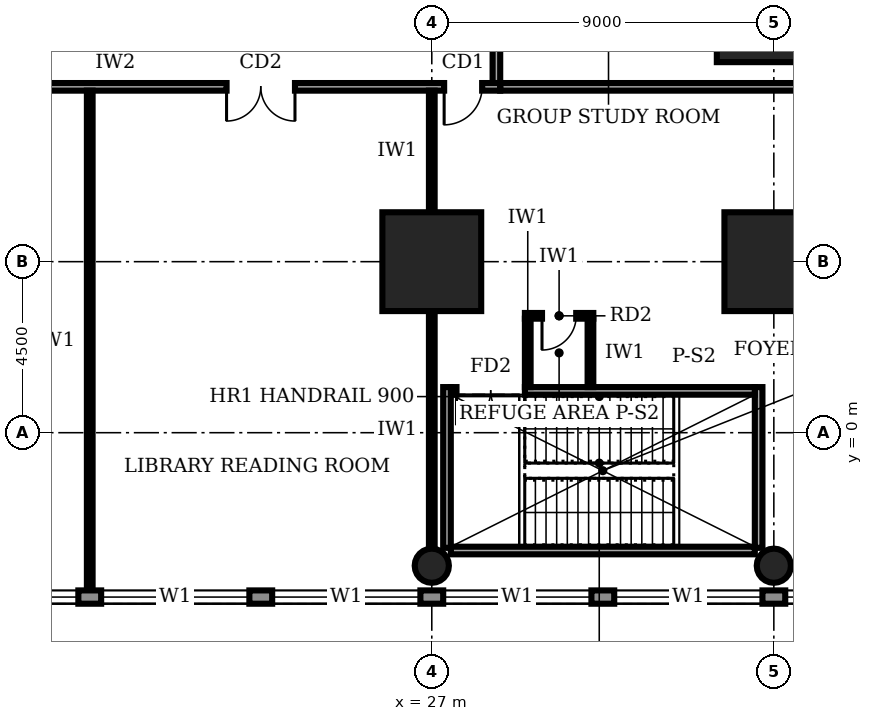
"""IFC4 building model, lengths in metres.
Left out: names, types, materials, properties, quantities, classifications, styles, units other than length and angle.
Written with IfcOpenShell. Run it as: python <this file> out.ifc"""

import sys

from ifc_helpers import new_model, si_unit, direction, frame, frame_2d, origin, origin_2d, place, context, subcontext, project, spatial, rectangle, circle, extrude, element, fill, save


model = new_model("IFC4")
c1 = context("Model", 3, precision=1e-05, world=origin(), true_north=direction((0.0, 1.0)))
c2 = subcontext(c1, "Body", "Model", "MODEL_VIEW")
j1 = project(units=[si_unit("LENGTHUNIT", "METRE"), si_unit("PLANEANGLEUNIT", "RADIAN")], contexts=[c1])
p1 = place(None, origin())
s1 = spatial("IfcSite", under=j1, at=p1, CompositionType="ELEMENT")
p2 = place(p1, origin())
s2 = spatial("IfcBuilding", under=s1, at=p2, CompositionType="ELEMENT")
p3 = place(p2, frame((0.0, 0.0, 11.0)))
s3 = spatial("IfcBuildingStorey", under=s2, at=p3, CompositionType="ELEMENT", Elevation=11.0)
for number, where, z_axis, x_axis in (
    (1, (27.0, 4.5, 0.0), (0.0, 0.0, 1.0), (1.0, 0.0, 0.0)),
    (2, (36.0, 4.5, 0.0), (0.0, 0.0, 1.0), (1.0, 0.0, 0.0)),
):
    element("IfcColumn", number, at=place(p3, frame(where, z_axis=z_axis, x_axis=x_axis)), inside=s3, PredefinedType="COLUMN", context=c2, shape_type="SweptSolid", body=[
        extrude(rectangle(XDim=2.6, YDim=2.6, at=origin_2d()), origin(), (0.0, 0.0, 1.0), 5.0),
    ])
p4 = place(p3, frame((36.0, 11.25, 0.0), z_axis=(0.0, 0.0, 1.0), x_axis=(1.0, 0.0, 0.0)))
e3 = element("IfcColumn", 3, at=p4, inside=s3, PredefinedType="COLUMN", context=c2, shape_type="SweptSolid", body=[
    extrude(rectangle(XDim=3.0, YDim=3.0, at=origin_2d()), origin(), (0.0, 0.0, 1.0), 5.0),
])
for number, where, z_axis, x_axis in (
    (4, (27.0, -3.5, 0.0), (0.0, 0.0, 1.0), (1.0, 0.0, 0.0)),
    (5, (36.0, -3.5, 0.0), (0.0, 0.0, 1.0), (1.0, 0.0, 0.0)),
):
    element("IfcColumn", number, at=place(p3, frame(where, z_axis=z_axis, x_axis=x_axis)), inside=s3, PredefinedType="COLUMN", context=c2, shape_type="SweptSolid", body=[
        extrude(circle(Radius=0.45, at=origin_2d()), origin(), (0.0, 0.0, 1.0), 5.0),
    ])
p5 = place(p3, frame((0.02, -4.325, 0.0), z_axis=(0.0, 0.0, 1.0), x_axis=(1.0, 0.0, 0.0)))
e6 = element("IfcWall", 6, at=p5, inside=s3, PredefinedType="STANDARD", context=c2, shape_type="SweptSolid", body=[
    extrude(rectangle(XDim=98.96, YDim=0.35, at=frame_2d((49.48, 0.0))), origin(), (0.0, 0.0, 1.0), 4.7),
])
p6 = place(p5, frame((4.78, 0.0, 0.9)))
e7 = element("IfcOpeningElement", 7, at=p6, cuts=e6, PredefinedType="OPENING", context=c2, shape_type="SweptSolid", body=[
    extrude(rectangle(XDim=3.9, YDim=2.2, at=frame_2d((1.95, 1.1))), frame((0.0, 0.185, 0.0), z_axis=(0.0, -1.0, 0.0), x_axis=(1.0, 0.0, 0.0)), (0.0, 0.0, 1.0), 0.37),
])
p7 = place(p5, frame((9.28, 0.0, 0.9)))
e8 = element("IfcOpeningElement", 8, at=p7, cuts=e6, PredefinedType="OPENING", context=c2, shape_type="SweptSolid", body=[
    extrude(rectangle(XDim=3.9, YDim=2.2, at=frame_2d((1.95, 1.1))), frame((0.0, 0.185, 0.0), z_axis=(0.0, -1.0, 0.0), x_axis=(1.0, 0.0, 0.0)), (0.0, 0.0, 1.0), 0.37),
])
p8 = place(p5, frame((13.78, 0.0, 0.9)))
e9 = element("IfcOpeningElement", 9, at=p8, cuts=e6, PredefinedType="OPENING", context=c2, shape_type="SweptSolid", body=[
    extrude(rectangle(XDim=3.9, YDim=2.2, at=frame_2d((1.95, 1.1))), frame((0.0, 0.185, 0.0), z_axis=(0.0, -1.0, 0.0), x_axis=(1.0, 0.0, 0.0)), (0.0, 0.0, 1.0), 0.37),
])
p9 = place(p5, frame((18.28, 0.0, 0.9)))
e10 = element("IfcOpeningElement", 10, at=p9, cuts=e6, PredefinedType="OPENING", context=c2, shape_type="SweptSolid", body=[
    extrude(rectangle(XDim=3.9, YDim=2.2, at=frame_2d((1.95, 1.1))), frame((0.0, 0.185, 0.0), z_axis=(0.0, -1.0, 0.0), x_axis=(1.0, 0.0, 0.0)), (0.0, 0.0, 1.0), 0.37),
])
p10 = place(p5, frame((22.78, 0.0, 0.9)))
e11 = element("IfcOpeningElement", 11, at=p10, cuts=e6, PredefinedType="OPENING", context=c2, shape_type="SweptSolid", body=[
    extrude(rectangle(XDim=3.9, YDim=2.2, at=frame_2d((1.95, 1.1))), frame((0.0, 0.185, 0.0), z_axis=(0.0, -1.0, 0.0), x_axis=(1.0, 0.0, 0.0)), (0.0, 0.0, 1.0), 0.37),
])
p11 = place(p5, frame((27.28, 0.0, 0.9)))
e12 = element("IfcOpeningElement", 12, at=p11, cuts=e6, PredefinedType="OPENING", context=c2, shape_type="SweptSolid", body=[
    extrude(rectangle(XDim=3.9, YDim=2.2, at=frame_2d((1.95, 1.1))), frame((0.0, 0.185, 0.0), z_axis=(0.0, -1.0, 0.0), x_axis=(1.0, 0.0, 0.0)), (0.0, 0.0, 1.0), 0.37),
])
p12 = place(p5, frame((31.78, 0.0, 0.9)))
e13 = element("IfcOpeningElement", 13, at=p12, cuts=e6, PredefinedType="OPENING", context=c2, shape_type="SweptSolid", body=[
    extrude(rectangle(XDim=3.9, YDim=2.2, at=frame_2d((1.95, 1.1))), frame((0.0, 0.185, 0.0), z_axis=(0.0, -1.0, 0.0), x_axis=(1.0, 0.0, 0.0)), (0.0, 0.0, 1.0), 0.37),
])
p13 = place(p5, frame((36.28, 0.0, 0.9)))
e14 = element("IfcOpeningElement", 14, at=p13, cuts=e6, PredefinedType="OPENING", context=c2, shape_type="SweptSolid", body=[
    extrude(rectangle(XDim=3.9, YDim=2.2, at=frame_2d((1.95, 1.1))), frame((0.0, 0.185, 0.0), z_axis=(0.0, -1.0, 0.0), x_axis=(1.0, 0.0, 0.0)), (0.0, 0.0, 1.0), 0.37),
])
p14 = place(p5, frame((40.78, 0.0, 0.9)))
e15 = element("IfcOpeningElement", 15, at=p14, cuts=e6, PredefinedType="OPENING", context=c2, shape_type="SweptSolid", body=[
    extrude(rectangle(XDim=3.9, YDim=2.2, at=frame_2d((1.95, 1.1))), frame((0.0, 0.185, 0.0), z_axis=(0.0, -1.0, 0.0), x_axis=(1.0, 0.0, 0.0)), (0.0, 0.0, 1.0), 0.37),
])
p15 = place(p5, frame((45.28, 0.0, 0.9)))
e16 = element("IfcOpeningElement", 16, at=p15, cuts=e6, PredefinedType="OPENING", context=c2, shape_type="SweptSolid", body=[
    extrude(rectangle(XDim=3.9, YDim=2.2, at=frame_2d((1.95, 1.1))), frame((0.0, 0.185, 0.0), z_axis=(0.0, -1.0, 0.0), x_axis=(1.0, 0.0, 0.0)), (0.0, 0.0, 1.0), 0.37),
])
p16 = place(p5, frame((49.78, 0.0, 0.9)))
e17 = element("IfcOpeningElement", 17, at=p16, cuts=e6, PredefinedType="OPENING", context=c2, shape_type="SweptSolid", body=[
    extrude(rectangle(XDim=3.9, YDim=2.2, at=frame_2d((1.95, 1.1))), frame((0.0, 0.185, 0.0), z_axis=(0.0, -1.0, 0.0), x_axis=(1.0, 0.0, 0.0)), (0.0, 0.0, 1.0), 0.37),
])
p17 = place(p5, frame((54.28, 0.0, 0.9)))
e18 = element("IfcOpeningElement", 18, at=p17, cuts=e6, PredefinedType="OPENING", context=c2, shape_type="SweptSolid", body=[
    extrude(rectangle(XDim=3.9, YDim=2.2, at=frame_2d((1.95, 1.1))), frame((0.0, 0.185, 0.0), z_axis=(0.0, -1.0, 0.0), x_axis=(1.0, 0.0, 0.0)), (0.0, 0.0, 1.0), 0.37),
])
p18 = place(p5, frame((58.78, 0.0, 0.9)))
e19 = element("IfcOpeningElement", 19, at=p18, cuts=e6, PredefinedType="OPENING", context=c2, shape_type="SweptSolid", body=[
    extrude(rectangle(XDim=3.9, YDim=2.2, at=frame_2d((1.95, 1.1))), frame((0.0, 0.185, 0.0), z_axis=(0.0, -1.0, 0.0), x_axis=(1.0, 0.0, 0.0)), (0.0, 0.0, 1.0), 0.37),
])
p19 = place(p5, frame((63.28, 0.0, 0.9)))
e20 = element("IfcOpeningElement", 20, at=p19, cuts=e6, PredefinedType="OPENING", context=c2, shape_type="SweptSolid", body=[
    extrude(rectangle(XDim=3.9, YDim=2.2, at=frame_2d((1.95, 1.1))), frame((0.0, 0.185, 0.0), z_axis=(0.0, -1.0, 0.0), x_axis=(1.0, 0.0, 0.0)), (0.0, 0.0, 1.0), 0.37),
])
p20 = place(p5, frame((67.78, 0.0, 0.9)))
e21 = element("IfcOpeningElement", 21, at=p20, cuts=e6, PredefinedType="OPENING", context=c2, shape_type="SweptSolid", body=[
    extrude(rectangle(XDim=3.9, YDim=2.2, at=frame_2d((1.95, 1.1))), frame((0.0, 0.185, 0.0), z_axis=(0.0, -1.0, 0.0), x_axis=(1.0, 0.0, 0.0)), (0.0, 0.0, 1.0), 0.37),
])
p21 = place(p5, frame((72.28, 0.0, 0.9)))
e22 = element("IfcOpeningElement", 22, at=p21, cuts=e6, PredefinedType="OPENING", context=c2, shape_type="SweptSolid", body=[
    extrude(rectangle(XDim=3.9, YDim=2.2, at=frame_2d((1.95, 1.1))), frame((0.0, 0.185, 0.0), z_axis=(0.0, -1.0, 0.0), x_axis=(1.0, 0.0, 0.0)), (0.0, 0.0, 1.0), 0.37),
])
p22 = place(p5, frame((76.78, 0.0, 0.9)))
e23 = element("IfcOpeningElement", 23, at=p22, cuts=e6, PredefinedType="OPENING", context=c2, shape_type="SweptSolid", body=[
    extrude(rectangle(XDim=3.9, YDim=2.2, at=frame_2d((1.95, 1.1))), frame((0.0, 0.185, 0.0), z_axis=(0.0, -1.0, 0.0), x_axis=(1.0, 0.0, 0.0)), (0.0, 0.0, 1.0), 0.37),
])
p23 = place(p5, frame((81.28, 0.0, 0.9)))
e24 = element("IfcOpeningElement", 24, at=p23, cuts=e6, PredefinedType="OPENING", context=c2, shape_type="SweptSolid", body=[
    extrude(rectangle(XDim=3.9, YDim=2.2, at=frame_2d((1.95, 1.1))), frame((0.0, 0.185, 0.0), z_axis=(0.0, -1.0, 0.0), x_axis=(1.0, 0.0, 0.0)), (0.0, 0.0, 1.0), 0.37),
])
p24 = place(p5, frame((85.78, 0.0, 0.9)))
e25 = element("IfcOpeningElement", 25, at=p24, cuts=e6, PredefinedType="OPENING", context=c2, shape_type="SweptSolid", body=[
    extrude(rectangle(XDim=3.9, YDim=2.2, at=frame_2d((1.95, 1.1))), frame((0.0, 0.185, 0.0), z_axis=(0.0, -1.0, 0.0), x_axis=(1.0, 0.0, 0.0)), (0.0, 0.0, 1.0), 0.37),
])
p25 = place(p5, frame((90.28, 0.0, 0.9)))
e26 = element("IfcOpeningElement", 26, at=p25, cuts=e6, PredefinedType="OPENING", context=c2, shape_type="SweptSolid", body=[
    extrude(rectangle(XDim=3.9, YDim=2.2, at=frame_2d((1.95, 1.1))), frame((0.0, 0.185, 0.0), z_axis=(0.0, -1.0, 0.0), x_axis=(1.0, 0.0, 0.0)), (0.0, 0.0, 1.0), 0.37),
])
p26 = place(p5, frame((94.71, 0.0, 0.9)))
e27 = element("IfcOpeningElement", 27, at=p26, cuts=e6, PredefinedType="OPENING", context=c2, shape_type="SweptSolid", body=[
    extrude(rectangle(XDim=3.9, YDim=2.2, at=frame_2d((1.95, 1.1))), frame((0.0, 0.185, 0.0), z_axis=(0.0, -1.0, 0.0), x_axis=(1.0, 0.0, 0.0)), (0.0, 0.0, 1.0), 0.37),
])
p27 = place(p3, frame((11.9, 9.1, 0.0), z_axis=(0.0, 0.0, 1.0), x_axis=(1.0, 0.0, 0.0)))
e28 = element("IfcWall", 28, at=p27, inside=s3, PredefinedType="SOLIDWALL", context=c2, shape_type="SweptSolid", body=[
    extrude(rectangle(XDim=16.9, YDim=0.2, at=frame_2d((8.45, 0.0))), origin(), (0.0, 0.0, 1.0), 4.7),
])
p28 = place(p27, frame((2.05, 0.0, 0.0)))
e29 = element("IfcOpeningElement", 29, at=p28, cuts=e28, PredefinedType="OPENING", context=c2, shape_type="SweptSolid", body=[
    extrude(rectangle(XDim=1.8, YDim=2.1, at=frame_2d((0.9, 1.05))), frame((0.0, 0.11, 0.0), z_axis=(0.0, -1.0, 0.0), x_axis=(1.0, 0.0, 0.0)), (0.0, 0.0, 1.0), 0.22),
])
p29 = place(p27, frame((9.7, 0.0, 0.0)))
e30 = element("IfcOpeningElement", 30, at=p29, cuts=e28, PredefinedType="OPENING", context=c2, shape_type="SweptSolid", body=[
    extrude(rectangle(XDim=1.8, YDim=2.1, at=frame_2d((0.9, 1.05))), frame((0.0, 0.11, 0.0), z_axis=(0.0, -1.0, 0.0), x_axis=(1.0, 0.0, 0.0)), (0.0, 0.0, 1.0), 0.22),
])
p30 = place(p27, frame((15.425, 0.0, 0.0)))
e31 = element("IfcOpeningElement", 31, at=p30, cuts=e28, PredefinedType="OPENING", context=c2, shape_type="SweptSolid", body=[
    extrude(rectangle(XDim=1.0, YDim=2.1, at=frame_2d((0.5, 1.05))), frame((0.0, 0.11, 0.0), z_axis=(0.0, -1.0, 0.0), x_axis=(1.0, 0.0, 0.0)), (0.0, 0.0, 1.0), 0.22),
])
p31 = place(p3, frame((28.7, 9.2, 0.0), z_axis=(0.0, 0.0, 1.0), x_axis=(0.0, 1.0, 0.0)))
e32 = element("IfcWall", 32, at=p31, inside=s3, PredefinedType="SOLIDWALL", context=c2, shape_type="SweptSolid", body=[
    extrude(rectangle(XDim=22.3, YDim=0.2, at=frame_2d((11.15, 0.0))), origin(), (0.0, 0.0, 1.0), 4.7),
])
p32 = place(p31, frame((1.55, 0.0, 0.0)))
e33 = element("IfcOpeningElement", 33, at=p32, cuts=e32, PredefinedType="OPENING", context=c2, shape_type="SweptSolid", body=[
    extrude(rectangle(XDim=1.0, YDim=2.1, at=frame_2d((0.5, 1.05))), frame((0.0, 0.11, 0.0), z_axis=(0.0, -1.0, 0.0), x_axis=(1.0, 0.0, 0.0)), (0.0, 0.0, 1.0), 0.22),
])
p33 = place(p31, frame((6.05, 0.0, 0.0)))
e34 = element("IfcOpeningElement", 34, at=p33, cuts=e32, PredefinedType="OPENING", context=c2, shape_type="SweptSolid", body=[
    extrude(rectangle(XDim=1.0, YDim=2.1, at=frame_2d((0.5, 1.05))), frame((0.0, 0.11, 0.0), z_axis=(0.0, -1.0, 0.0), x_axis=(1.0, 0.0, 0.0)), (0.0, 0.0, 1.0), 0.22),
])
p34 = place(p31, frame((12.4, 0.0, 0.0)))
e35 = element("IfcOpeningElement", 35, at=p34, cuts=e32, PredefinedType="OPENING", context=c2, shape_type="SweptSolid", body=[
    extrude(rectangle(XDim=1.8, YDim=2.1, at=frame_2d((0.9, 1.05))), frame((0.0, 0.11, 0.0), z_axis=(0.0, -1.0, 0.0), x_axis=(1.0, 0.0, 0.0)), (0.0, 0.0, 1.0), 0.22),
])
p35 = place(p31, frame((19.55, 0.0, 0.0)))
e36 = element("IfcOpeningElement", 36, at=p35, cuts=e32, PredefinedType="OPENING", context=c2, shape_type="SweptSolid", body=[
    extrude(rectangle(XDim=1.0, YDim=2.1, at=frame_2d((0.5, 1.05))), frame((0.0, 0.11, 0.0), z_axis=(0.0, -1.0, 0.0), x_axis=(1.0, 0.0, 0.0)), (0.0, 0.0, 1.0), 0.22),
])
p36 = place(p3, frame((28.8, 9.1, 0.0), z_axis=(0.0, 0.0, 1.0), x_axis=(1.0, 0.0, 0.0)))
e37 = element("IfcWall", 37, at=p36, inside=s3, PredefinedType="SOLIDWALL", context=c2, shape_type="SweptSolid", body=[
    extrude(rectangle(XDim=11.52, YDim=0.2, at=frame_2d((5.76, 0.0))), origin(), (0.0, 0.0, 1.0), 4.7),
])
p37 = place(p3, frame((18.0, -4.2, 0.0), z_axis=(0.0, 0.0, 1.0), x_axis=(0.0, 1.0, 0.0)))
e38 = element("IfcWall", 38, at=p37, inside=s3, PredefinedType="PARTITIONING", context=c2, shape_type="SweptSolid", body=[
    extrude(rectangle(XDim=13.2, YDim=0.15, at=frame_2d((6.6, 0.0))), origin(), (0.0, 0.0, 1.0), 4.7),
])
p38 = place(p3, frame((27.0, -3.03, 0.0), z_axis=(0.0, 0.0, 1.0), x_axis=(0.0, 1.0, 0.0)))
e39 = element("IfcWall", 39, at=p38, inside=s3, PredefinedType="PARTITIONING", context=c2, shape_type="SweptSolid", body=[
    extrude(rectangle(XDim=6.21, YDim=0.15, at=frame_2d((3.105, 0.0))), origin(), (0.0, 0.0, 1.0), 3.7),
])
p39 = place(p3, frame((27.0, 5.82, 0.0), z_axis=(0.0, 0.0, 1.0), x_axis=(0.0, 1.0, 0.0)))
e40 = element("IfcWall", 40, at=p39, inside=s3, PredefinedType="PARTITIONING", context=c2, shape_type="SweptSolid", body=[
    extrude(rectangle(XDim=3.18, YDim=0.15, at=frame_2d((1.59, 0.0))), origin(), (0.0, 0.0, 1.0), 3.8),
])
p40 = place(p3, frame((27.5, 1.1, 0.0), z_axis=(0.0, 0.0, 1.0), x_axis=(1.0, 0.0, 0.0)))
e41 = element("IfcWall", 41, at=p40, inside=s3, PredefinedType="SOLIDWALL", context=c2, shape_type="SweptSolid", body=[
    extrude(rectangle(XDim=8.0, YDim=0.2, at=frame_2d((4.0, 0.0))), origin(), (0.0, 0.0, 1.0), 4.7),
])
p41 = place(p40, frame((0.15, 0.0, 0.0)))
e42 = element("IfcOpeningElement", 42, at=p41, cuts=e41, PredefinedType="OPENING", context=c2, shape_type="SweptSolid", body=[
    extrude(rectangle(XDim=1.8, YDim=2.1, at=frame_2d((0.9, 1.05))), frame((0.0, 0.11, 0.0), z_axis=(0.0, -1.0, 0.0), x_axis=(1.0, 0.0, 0.0)), (0.0, 0.0, 1.0), 0.22),
])
p42 = place(p3, frame((27.5, -3.1, 0.0), z_axis=(0.0, 0.0, 1.0), x_axis=(1.0, 0.0, 0.0)))
e43 = element("IfcWall", 43, at=p42, inside=s3, PredefinedType="SOLIDWALL", context=c2, shape_type="SweptSolid", body=[
    extrude(rectangle(XDim=8.0, YDim=0.2, at=frame_2d((4.0, 0.0))), origin(), (0.0, 0.0, 1.0), 4.7),
])
for number, where, z_axis, x_axis in (
    (44, (27.4, -3.03, 0.0), (0.0, 0.0, 1.0), (0.0, 1.0, 0.0)),
    (45, (35.6, -3.03, 0.0), (0.0, 0.0, 1.0), (0.0, 1.0, 0.0)),
):
    element("IfcWall", number, at=place(p3, frame(where, z_axis=z_axis, x_axis=x_axis)), inside=s3, PredefinedType="SOLIDWALL", context=c2, shape_type="SweptSolid", body=[
        extrude(rectangle(XDim=4.23, YDim=0.2, at=frame_2d((2.115, 0.0))), origin(), (0.0, 0.0, 1.0), 4.7),
    ])
p43 = place(p3, frame((31.175, 1.2, 0.0), z_axis=(0.0, 0.0, 1.0), x_axis=(0.0, 1.0, 0.0)))
e46 = element("IfcWall", 46, at=p43, inside=s3, PredefinedType="PARTITIONING", context=c2, shape_type="SweptSolid", body=[
    extrude(rectangle(XDim=1.8, YDim=0.15, at=frame_2d((0.9, 0.0))), origin(), (0.0, 0.0, 1.0), 4.7),
])
p44 = place(p3, frame((29.45, 3.075, 0.0), z_axis=(0.0, 0.0, 1.0), x_axis=(1.0, 0.0, 0.0)))
e47 = element("IfcWall", 47, at=p44, inside=s3, PredefinedType="PARTITIONING", context=c2, shape_type="SweptSolid", body=[
    extrude(rectangle(XDim=1.8, YDim=0.15, at=frame_2d((0.9, 0.0))), origin(), (0.0, 0.0, 1.0), 4.7),
])
p45 = place(p44, frame((0.45, 0.0, 0.0)))
e48 = element("IfcOpeningElement", 48, at=p45, cuts=e47, PredefinedType="OPENING", context=c2, shape_type="SweptSolid", body=[
    extrude(rectangle(XDim=0.9, YDim=2.1, at=frame_2d((0.45, 1.05))), frame((0.0, 0.085, 0.0), z_axis=(0.0, -1.0, 0.0), x_axis=(1.0, 0.0, 0.0)), (0.0, 0.0, 1.0), 0.17),
])
p46 = place(p3, frame((29.525, 1.2, 0.0), z_axis=(0.0, 0.0, 1.0), x_axis=(0.0, 1.0, 0.0)))
e49 = element("IfcWall", 49, at=p46, inside=s3, PredefinedType="PARTITIONING", context=c2, shape_type="SweptSolid", body=[
    extrude(rectangle(XDim=1.8, YDim=0.15, at=frame_2d((0.9, 0.0))), origin(), (0.0, 0.0, 1.0), 4.7),
])
p47 = place(p8, origin())
e50 = element("IfcWindow", 50, at=p47, inside=s3, PartitioningType="SINGLE_PANEL", PredefinedType="WINDOW", context=c2, shape_type="SweptSolid", body=[
    extrude(rectangle(XDim=3.9, YDim=2.2, at=frame_2d((1.95, 1.1))), frame((0.0, 0.03, 0.0), z_axis=(0.0, -1.0, 0.0), x_axis=(1.0, 0.0, 0.0)), (0.0, 0.0, 1.0), 0.06),
])
fill(e9, e50)
p48 = place(p9, origin())
e51 = element("IfcWindow", 51, at=p48, inside=s3, PartitioningType="SINGLE_PANEL", PredefinedType="WINDOW", context=c2, shape_type="SweptSolid", body=[
    extrude(rectangle(XDim=3.9, YDim=2.2, at=frame_2d((1.95, 1.1))), frame((0.0, 0.03, 0.0), z_axis=(0.0, -1.0, 0.0), x_axis=(1.0, 0.0, 0.0)), (0.0, 0.0, 1.0), 0.06),
])
fill(e10, e51)
p49 = place(p10, origin())
e52 = element("IfcWindow", 52, at=p49, inside=s3, PartitioningType="SINGLE_PANEL", PredefinedType="WINDOW", context=c2, shape_type="SweptSolid", body=[
    extrude(rectangle(XDim=3.9, YDim=2.2, at=frame_2d((1.95, 1.1))), frame((0.0, 0.03, 0.0), z_axis=(0.0, -1.0, 0.0), x_axis=(1.0, 0.0, 0.0)), (0.0, 0.0, 1.0), 0.06),
])
fill(e11, e52)
p50 = place(p11, origin())
e53 = element("IfcWindow", 53, at=p50, inside=s3, PartitioningType="SINGLE_PANEL", PredefinedType="WINDOW", context=c2, shape_type="SweptSolid", body=[
    extrude(rectangle(XDim=3.9, YDim=2.2, at=frame_2d((1.95, 1.1))), frame((0.0, 0.03, 0.0), z_axis=(0.0, -1.0, 0.0), x_axis=(1.0, 0.0, 0.0)), (0.0, 0.0, 1.0), 0.06),
])
fill(e12, e53)
p51 = place(p12, origin())
e54 = element("IfcWindow", 54, at=p51, inside=s3, PartitioningType="SINGLE_PANEL", PredefinedType="WINDOW", context=c2, shape_type="SweptSolid", body=[
    extrude(rectangle(XDim=3.9, YDim=2.2, at=frame_2d((1.95, 1.1))), frame((0.0, 0.03, 0.0), z_axis=(0.0, -1.0, 0.0), x_axis=(1.0, 0.0, 0.0)), (0.0, 0.0, 1.0), 0.06),
])
fill(e13, e54)
p52 = place(p13, origin())
e55 = element("IfcWindow", 55, at=p52, inside=s3, PartitioningType="SINGLE_PANEL", PredefinedType="WINDOW", context=c2, shape_type="SweptSolid", body=[
    extrude(rectangle(XDim=3.9, YDim=2.2, at=frame_2d((1.95, 1.1))), frame((0.0, 0.03, 0.0), z_axis=(0.0, -1.0, 0.0), x_axis=(1.0, 0.0, 0.0)), (0.0, 0.0, 1.0), 0.06),
])
fill(e14, e55)
p53 = place(p29, frame((1.8, 0.0, 0.0), z_axis=(0.0, 0.0, 1.0), x_axis=(-1.0, 0.0, 0.0)))
e56 = element("IfcDoor", 56, at=p53, inside=s3, OperationType="DOUBLE_DOOR_SINGLE_SWING", PredefinedType="DOOR", context=c2, shape_type="SweptSolid", body=[
    extrude(rectangle(XDim=1.8, YDim=2.1, at=frame_2d((0.9, 1.05))), frame((0.0, 0.025, 0.0), z_axis=(0.0, -1.0, 0.0), x_axis=(1.0, 0.0, 0.0)), (0.0, 0.0, 1.0), 0.05),
])
fill(e30, e56)
p54 = place(p30, frame((1.0, 0.0, 0.0), z_axis=(0.0, 0.0, 1.0), x_axis=(-1.0, 0.0, 0.0)))
e57 = element("IfcDoor", 57, at=p54, inside=s3, OperationType="SINGLE_SWING_RIGHT", PredefinedType="DOOR", context=c2, shape_type="SweptSolid", body=[
    extrude(rectangle(XDim=1.0, YDim=2.1, at=frame_2d((0.5, 1.05))), frame((0.0, 0.025, 0.0), z_axis=(0.0, -1.0, 0.0), x_axis=(1.0, 0.0, 0.0)), (0.0, 0.0, 1.0), 0.05),
])
fill(e31, e57)
p55 = place(p41, frame((1.8, 0.0, 0.0), z_axis=(0.0, 0.0, 1.0), x_axis=(-1.0, 0.0, 0.0)))
e58 = element("IfcDoor", 58, at=p55, inside=s3, OperationType="DOUBLE_DOOR_SINGLE_SWING", PredefinedType="DOOR", context=c2, shape_type="SweptSolid", body=[
    extrude(rectangle(XDim=1.8, YDim=2.1, at=frame_2d((0.9, 1.05))), frame((0.0, 0.025, 0.0), z_axis=(0.0, -1.0, 0.0), x_axis=(1.0, 0.0, 0.0)), (0.0, 0.0, 1.0), 0.05),
])
fill(e42, e58)
p56 = place(p45, frame((0.9, 0.0, 0.0), z_axis=(0.0, 0.0, 1.0), x_axis=(-1.0, 0.0, 0.0)))
e59 = element("IfcDoor", 59, at=p56, inside=s3, OperationType="SINGLE_SWING_RIGHT", PredefinedType="DOOR", context=c2, shape_type="SweptSolid", body=[
    extrude(rectangle(XDim=0.9, YDim=2.1, at=frame_2d((0.45, 1.05))), frame((0.0, 0.025, 0.0), z_axis=(0.0, -1.0, 0.0), x_axis=(1.0, 0.0, 0.0)), (0.0, 0.0, 1.0), 0.05),
])
fill(e48, e59)
save(model, sys.argv[1])
